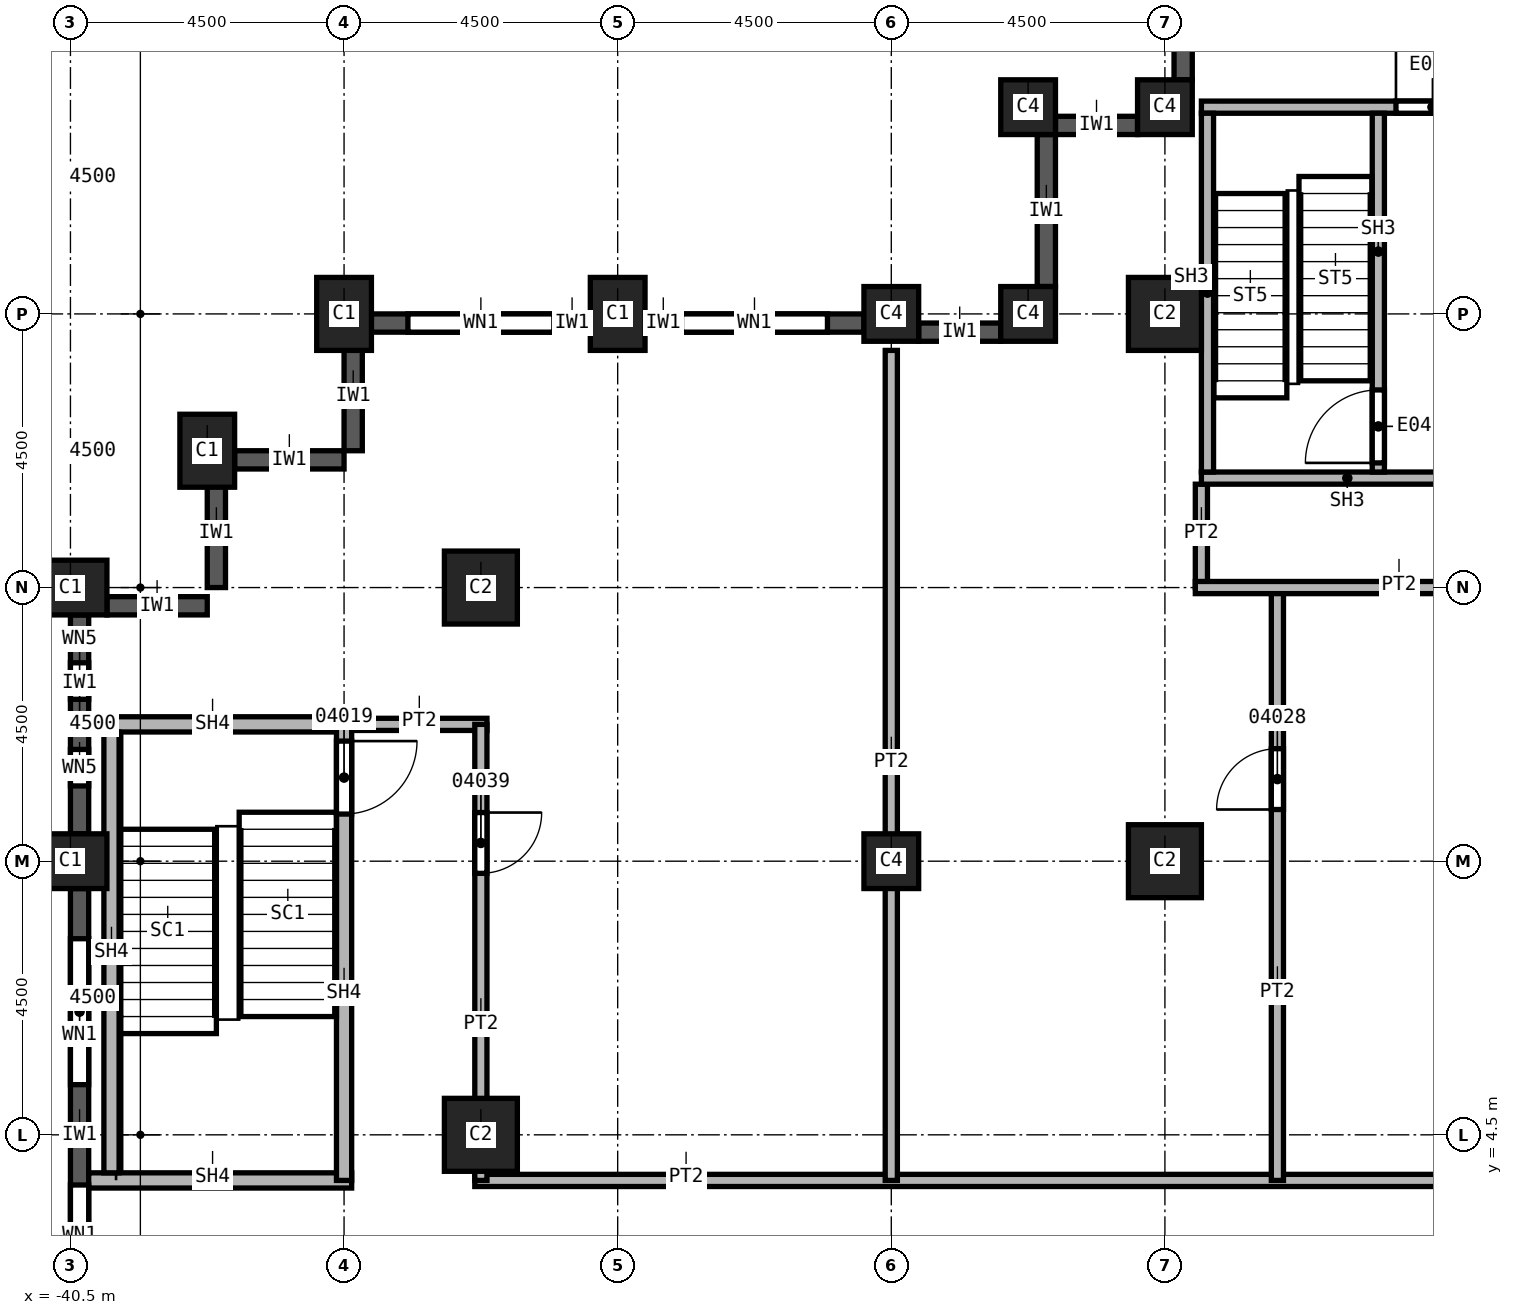
"""IFC4 building model, lengths in metres.
Left out: names, types, materials, properties, quantities, classifications, styles, units other than length and angle.
Written with IfcOpenShell. Run it as: python <this file> out.ifc"""

import sys

from ifc_helpers import new_model, si_unit, direction, frame, frame_2d, origin, origin_2d, place, context, subcontext, project, spatial, rectangle, extrude, element, fill, save


model = new_model("IFC4")
c1 = context("Model", 3, precision=1e-05, world=origin(), true_north=direction((0.0, 1.0)))
c2 = subcontext(c1, "Body", "Model", "MODEL_VIEW")
j1 = project(units=[si_unit("LENGTHUNIT", "METRE"), si_unit("PLANEANGLEUNIT", "RADIAN")], contexts=[c1])
p1 = place(None, origin())
s1 = spatial("IfcSite", under=j1, at=p1, CompositionType="ELEMENT")
p2 = place(p1, origin())
s2 = spatial("IfcBuilding", under=s1, at=p2, CompositionType="ELEMENT")
p3 = place(p2, frame((0.0, 0.0, 104.0)))
s3 = spatial("IfcBuildingStorey", under=s2, at=p3, CompositionType="ELEMENT", Elevation=104.0)
for number, where, z_axis, x_axis in (
    (1, (-40.5, 9.0, 0.0), (0.0, 0.0, 1.0), (0.0, 1.0, 0.0)),
    (2, (-40.5, 13.5, 0.0), (0.0, 0.0, 1.0), (0.0, 1.0, 0.0)),
    (3, (-38.25, 15.75, 0.0), (0.0, 0.0, 1.0), (1.0, 0.0, 0.0)),
    (4, (-31.5, 18.0, 0.0), (0.0, 0.0, 1.0), (1.0, 0.0, 0.0)),
    (5, (-36.0, 18.0, 0.0), (0.0, 0.0, 1.0), (1.0, 0.0, 0.0)),
):
    element("IfcColumn", number, at=place(p3, frame(where, z_axis=z_axis, x_axis=x_axis)), inside=s3, PredefinedType="COLUMN", context=c2, shape_type="SweptSolid", body=[
        extrude(rectangle(XDim=0.9, YDim=1.2, at=origin_2d()), origin(), (0.0, 0.0, 1.0), 3.7),
    ])
for number, where, z_axis, x_axis in (
    (6, (-33.75, 4.5, 0.0), (0.0, 0.0, 1.0), (1.0, 0.0, 0.0)),
    (7, (-33.75, 13.5, 0.0), (0.0, 0.0, 1.0), (1.0, 0.0, 0.0)),
    (8, (-22.5, 9.0, 0.0), (0.0, 0.0, 1.0), (1.0, 0.0, 0.0)),
    (9, (-22.5, 18.0, 0.0), (0.0, 0.0, 1.0), (1.0, 0.0, 0.0)),
):
    element("IfcColumn", number, at=place(p3, frame(where, z_axis=z_axis, x_axis=x_axis)), inside=s3, PredefinedType="COLUMN", context=c2, shape_type="SweptSolid", body=[
        extrude(rectangle(XDim=1.2, YDim=1.2, at=origin_2d()), origin(), (0.0, 0.0, 1.0), 3.7),
    ])
for number, where, z_axis, x_axis in (
    (10, (-27.0, 9.0, 0.0), (0.0, 0.0, 1.0), (1.0, 0.0, 0.0)),
    (11, (-27.0, 18.0, 0.0), (0.0, 0.0, 1.0), (1.0, 0.0, 0.0)),
    (12, (-22.5, 21.4, 0.0), (0.0, 0.0, 1.0), (1.0, 0.0, 0.0)),
    (13, (-24.75, 21.4, 0.0), (0.0, 0.0, 1.0), (1.0, 0.0, 0.0)),
    (14, (-24.75, 18.0, 0.0), (0.0, 0.0, 1.0), (1.0, 0.0, 0.0)),
):
    element("IfcColumn", number, at=place(p3, frame(where, z_axis=z_axis, x_axis=x_axis)), inside=s3, PredefinedType="COLUMN", context=c2, shape_type="SweptSolid", body=[
        extrude(rectangle(XDim=0.9, YDim=0.9, at=origin_2d()), origin(), (0.0, 0.0, 1.0), 3.7),
    ])
for number, where, z_axis, x_axis in (
    (15, (-35.85, 17.55, 0.0), (0.0, 0.0, 1.0), (0.0, -1.0, 0.0)),
    (16, (-37.8, 15.6, 0.0), (0.0, 0.0, 1.0), (1.0, 0.0, 0.0)),
    (17, (-38.1, 15.3, 0.0), (0.0, 0.0, 1.0), (0.0, -1.0, 0.0)),
):
    element("IfcWall", number, at=place(p3, frame(where, z_axis=z_axis, x_axis=x_axis)), inside=s3, PredefinedType="SOLIDWALL", context=c2, shape_type="SweptSolid", body=[
        extrude(rectangle(XDim=1.8, YDim=0.3, at=frame_2d((0.9, 0.0))), origin(), (0.0, 0.0, 1.0), 3.1),
    ])
p4 = place(p3, frame((-39.9, 13.2, 0.0), z_axis=(0.0, 0.0, 1.0), x_axis=(1.0, 0.0, 0.0)))
e18 = element("IfcWall", 18, at=p4, inside=s3, PredefinedType="SOLIDWALL", context=c2, shape_type="SweptSolid", body=[
    extrude(rectangle(XDim=1.65, YDim=0.3, at=frame_2d((0.825, 0.0))), origin(), (0.0, 0.0, 1.0), 3.1),
])
p5 = place(p3, frame((-22.2, 24.2, 0.0), z_axis=(0.0, 0.0, 1.0), x_axis=(0.0, -1.0, 0.0)))
e19 = element("IfcWall", 19, at=p5, inside=s3, PredefinedType="SOLIDWALL", context=c2, shape_type="SweptSolid", body=[
    extrude(rectangle(XDim=2.35, YDim=0.3, at=frame_2d((1.175, 0.0))), origin(), (0.0, 0.0, 1.0), 3.1),
])
p6 = place(p3, frame((-22.95, 21.1, 0.0), z_axis=(0.0, 0.0, 1.0), x_axis=(-1.0, 0.0, 0.0)))
e20 = element("IfcWall", 20, at=p6, inside=s3, PredefinedType="SOLIDWALL", context=c2, shape_type="SweptSolid", body=[
    extrude(rectangle(XDim=1.35, YDim=0.3, at=frame_2d((0.675, 0.0))), origin(), (0.0, 0.0, 1.0), 3.1),
])
p7 = place(p3, frame((-24.45, 20.95, 0.0), z_axis=(0.0, 0.0, 1.0), x_axis=(0.0, -1.0, 0.0)))
e21 = element("IfcWall", 21, at=p7, inside=s3, PredefinedType="SOLIDWALL", context=c2, shape_type="SweptSolid", body=[
    extrude(rectangle(XDim=2.5, YDim=0.3, at=frame_2d((1.25, 0.0))), origin(), (0.0, 0.0, 1.0), 3.1),
])
p8 = place(p3, frame((-25.2, 17.7, 0.0), z_axis=(0.0, 0.0, 1.0), x_axis=(-1.0, 0.0, 0.0)))
e22 = element("IfcWall", 22, at=p8, inside=s3, PredefinedType="SOLIDWALL", context=c2, shape_type="SweptSolid", body=[
    extrude(rectangle(XDim=1.35, YDim=0.3, at=frame_2d((0.675, 0.0))), origin(), (0.0, 0.0, 1.0), 3.1),
])
p9 = place(p3, frame((-27.45, 17.85, 0.0), z_axis=(0.0, 0.0, 1.0), x_axis=(-1.0, 0.0, 0.0)))
e23 = element("IfcWall", 23, at=p9, inside=s3, PredefinedType="SOLIDWALL", context=c2, shape_type="SweptSolid", body=[
    extrude(rectangle(XDim=3.6, YDim=0.3, at=frame_2d((1.8, 0.0))), origin(), (0.0, 0.0, 1.0), 3.1),
])
p10 = place(p9, frame((0.6, 0.0, 0.8)))
e24 = element("IfcOpeningElement", 24, at=p10, cuts=e23, PredefinedType="OPENING", context=c2, shape_type="SweptSolid", body=[
    extrude(rectangle(XDim=2.4, YDim=1.95, at=frame_2d((1.2, 0.975))), frame((0.0, 0.15, 0.0), z_axis=(0.0, -1.0, 0.0), x_axis=(1.0, 0.0, 0.0)), (0.0, 0.0, 1.0), 0.3),
])
p11 = place(p3, frame((-31.95, 17.85, 0.0), z_axis=(0.0, 0.0, 1.0), x_axis=(-1.0, 0.0, 0.0)))
e25 = element("IfcWall", 25, at=p11, inside=s3, PredefinedType="SOLIDWALL", context=c2, shape_type="SweptSolid", body=[
    extrude(rectangle(XDim=3.6, YDim=0.3, at=frame_2d((1.8, 0.0))), origin(), (0.0, 0.0, 1.0), 3.1),
])
p12 = place(p11, frame((0.6, 0.0, 0.8)))
e26 = element("IfcOpeningElement", 26, at=p12, cuts=e25, PredefinedType="OPENING", context=c2, shape_type="SweptSolid", body=[
    extrude(rectangle(XDim=2.4, YDim=1.95, at=frame_2d((1.2, 0.975))), frame((0.0, 0.15, 0.0), z_axis=(0.0, -1.0, 0.0), x_axis=(1.0, 0.0, 0.0)), (0.0, 0.0, 1.0), 0.3),
])
p13 = place(p3, frame((-40.35, 13.05, 0.0), z_axis=(0.0, 0.0, 1.0), x_axis=(0.0, -1.0, 0.0)))
e27 = element("IfcWall", 27, at=p13, inside=s3, PredefinedType="SOLIDWALL", context=c2, shape_type="SweptSolid", body=[
    extrude(rectangle(XDim=3.6, YDim=0.3, at=frame_2d((1.8, 0.0))), origin(), (0.0, 0.0, 1.0), 3.1),
])
p14 = place(p13, frame((0.788, 0.0, 0.8)))
e28 = element("IfcOpeningElement", 28, at=p14, cuts=e27, PredefinedType="OPENING", context=c2, shape_type="SweptSolid", body=[
    extrude(rectangle(XDim=0.6, YDim=1.95, at=frame_2d((0.3, 0.975))), frame((0.0, 0.15, 0.0), z_axis=(0.0, -1.0, 0.0), x_axis=(1.0, 0.0, 0.0)), (0.0, 0.0, 1.0), 0.3),
])
p15 = place(p13, frame((2.212, 0.0, 0.8)))
e29 = element("IfcOpeningElement", 29, at=p15, cuts=e27, PredefinedType="OPENING", context=c2, shape_type="SweptSolid", body=[
    extrude(rectangle(XDim=0.6, YDim=1.95, at=frame_2d((0.3, 0.975))), frame((0.0, 0.15, 0.0), z_axis=(0.0, -1.0, 0.0), x_axis=(1.0, 0.0, 0.0)), (0.0, 0.0, 1.0), 0.3),
])
p16 = place(p3, frame((-40.35, 8.55, 0.0), z_axis=(0.0, 0.0, 1.0), x_axis=(0.0, -1.0, 0.0)))
e30 = element("IfcWall", 30, at=p16, inside=s3, PredefinedType="SOLIDWALL", context=c2, shape_type="SweptSolid", body=[
    extrude(rectangle(XDim=8.1, YDim=0.3, at=frame_2d((4.05, 0.0))), origin(), (0.0, 0.0, 1.0), 3.1),
])
p17 = place(p16, frame((0.825, 0.0, 0.8)))
e31 = element("IfcOpeningElement", 31, at=p17, cuts=e30, PredefinedType="OPENING", context=c2, shape_type="SweptSolid", body=[
    extrude(rectangle(XDim=2.4, YDim=1.95, at=frame_2d((1.2, 0.975))), frame((0.0, 0.15, 0.0), z_axis=(0.0, -1.0, 0.0), x_axis=(1.0, 0.0, 0.0)), (0.0, 0.0, 1.0), 0.3),
])
p18 = place(p16, frame((4.875, 0.0, 0.8)))
e32 = element("IfcOpeningElement", 32, at=p18, cuts=e30, PredefinedType="OPENING", context=c2, shape_type="SweptSolid", body=[
    extrude(rectangle(XDim=2.4, YDim=1.95, at=frame_2d((1.2, 0.975))), frame((0.0, 0.15, 0.0), z_axis=(0.0, -1.0, 0.0), x_axis=(1.0, 0.0, 0.0)), (0.0, 0.0, 1.0), 0.3),
])
p19 = place(p3, frame((-36.0, 11.25, 0.0), z_axis=(0.0, 0.0, 1.0), x_axis=(1.0, 0.0, 0.0)))
e33 = element("IfcWall", 33, at=p19, inside=s3, PredefinedType="PARTITIONING", context=c2, shape_type="SweptSolid", body=[
    extrude(rectangle(XDim=2.35, YDim=0.2, at=frame_2d((1.175, 0.0))), origin(), (0.0, 0.0, 1.0), 3.7),
])
p20 = place(p3, frame((-33.85, 3.75, 0.0), z_axis=(0.0, 0.0, 1.0), x_axis=(1.0, 0.0, 0.0)))
e34 = element("IfcWall", 34, at=p20, inside=s3, PredefinedType="PARTITIONING", context=c2, shape_type="SweptSolid", body=[
    extrude(rectangle(XDim=18.45, YDim=0.2, at=frame_2d((9.225, 0.0))), origin(), (0.0, 0.0, 1.0), 3.7),
])
p21 = place(p3, frame((-33.75, 11.25, 0.0), z_axis=(0.0, 0.0, 1.0), x_axis=(0.0, -1.0, 0.0)))
e35 = element("IfcWall", 35, at=p21, inside=s3, PredefinedType="PARTITIONING", context=c2, shape_type="SweptSolid", body=[
    extrude(rectangle(XDim=7.5, YDim=0.2, at=frame_2d((3.75, 0.0))), origin(), (0.0, 0.0, 1.0), 3.7),
])
p22 = place(p21, frame((1.45, 0.0, 0.0)))
e36 = element("IfcOpeningElement", 36, at=p22, cuts=e35, PredefinedType="OPENING", context=c2, shape_type="SweptSolid", body=[
    extrude(rectangle(XDim=1.0, YDim=2.1, at=frame_2d((0.5, 1.05))), frame((0.0, 0.1, 0.0), z_axis=(0.0, -1.0, 0.0), x_axis=(1.0, 0.0, 0.0)), (0.0, 0.0, 1.0), 0.2),
])
p23 = place(p3, frame((-27.0, 3.75, 0.0), z_axis=(0.0, 0.0, 1.0), x_axis=(0.0, 1.0, 0.0)))
e37 = element("IfcWall", 37, at=p23, inside=s3, PredefinedType="PARTITIONING", context=c2, shape_type="SweptSolid", body=[
    extrude(rectangle(XDim=13.65, YDim=0.2, at=frame_2d((6.825, 0.0))), origin(), (0.0, 0.0, 1.0), 3.7),
])
p24 = place(p3, frame((-21.9, 13.5, 0.0), z_axis=(0.0, 0.0, 1.0), x_axis=(0.0, 1.0, 0.0)))
e38 = element("IfcWall", 38, at=p24, inside=s3, PredefinedType="PARTITIONING", context=c2, shape_type="SweptSolid", body=[
    extrude(rectangle(XDim=1.7, YDim=0.2, at=frame_2d((0.85, 0.0))), origin(), (0.0, 0.0, 1.0), 3.7),
])
p25 = place(p3, frame((-20.65, 3.75, 0.0), z_axis=(0.0, 0.0, 1.0), x_axis=(0.0, 1.0, 0.0)))
e39 = element("IfcWall", 39, at=p25, inside=s3, PredefinedType="PARTITIONING", context=c2, shape_type="SweptSolid", body=[
    extrude(rectangle(XDim=9.75, YDim=0.2, at=frame_2d((4.875, 0.0))), origin(), (0.0, 0.0, 1.0), 3.7),
])
p26 = place(p25, frame((6.1, 0.0, 0.0)))
e40 = element("IfcOpeningElement", 40, at=p26, cuts=e39, PredefinedType="OPENING", context=c2, shape_type="SweptSolid", body=[
    extrude(rectangle(XDim=1.0, YDim=2.1, at=frame_2d((0.5, 1.05))), frame((0.0, 0.1, 0.0), z_axis=(0.0, -1.0, 0.0), x_axis=(1.0, 0.0, 0.0)), (0.0, 0.0, 1.0), 0.2),
])
p27 = place(p3, frame((-15.4, 13.5, 0.0), z_axis=(0.0, 0.0, 1.0), x_axis=(-1.0, 0.0, 0.0)))
e41 = element("IfcWall", 41, at=p27, inside=s3, PredefinedType="PARTITIONING", context=c2, shape_type="SweptSolid", body=[
    extrude(rectangle(XDim=6.6, YDim=0.2, at=frame_2d((3.3, 0.0))), origin(), (0.0, 0.0, 1.0), 3.7),
])
p28 = place(p3, frame((-40.2, 3.75, 0.0), z_axis=(0.0, 0.0, 1.0), x_axis=(1.0, 0.0, 0.0)))
e42 = element("IfcWall", 42, at=p28, inside=s3, PredefinedType="SOLIDWALL", context=c2, shape_type="SweptSolid", body=[
    extrude(rectangle(XDim=4.325, YDim=0.25, at=frame_2d((2.163, 0.0))), origin(), (0.0, 0.0, 1.0), 3.7),
])
p29 = place(p3, frame((-40.2, 11.25, 0.0), z_axis=(0.0, 0.0, 1.0), x_axis=(1.0, 0.0, 0.0)))
e43 = element("IfcWall", 43, at=p29, inside=s3, PredefinedType="SOLIDWALL", context=c2, shape_type="SweptSolid", body=[
    extrude(rectangle(XDim=4.2, YDim=0.25, at=frame_2d((2.1, 0.0))), origin(), (0.0, 0.0, 1.0), 3.7),
])
p30 = place(p3, frame((-36.0, 11.375, 0.0), z_axis=(0.0, 0.0, 1.0), x_axis=(0.0, -1.0, 0.0)))
e44 = element("IfcWall", 44, at=p30, inside=s3, PredefinedType="SOLIDWALL", context=c2, shape_type="SweptSolid", body=[
    extrude(rectangle(XDim=7.625, YDim=0.25, at=frame_2d((3.812, 0.0))), origin(), (0.0, 0.0, 1.0), 3.7),
])
p31 = place(p30, frame((0.4, 0.0, 0.0)))
e45 = element("IfcOpeningElement", 45, at=p31, cuts=e44, PredefinedType="OPENING", context=c2, shape_type="SweptSolid", body=[
    extrude(rectangle(XDim=1.2, YDim=2.1, at=frame_2d((0.6, 1.05))), frame((0.0, 0.125, 0.0), z_axis=(0.0, -1.0, 0.0), x_axis=(1.0, 0.0, 0.0)), (0.0, 0.0, 1.0), 0.25),
])
p32 = place(p3, frame((-21.9, 15.3, 0.0), z_axis=(0.0, 0.0, 1.0), x_axis=(1.0, 0.0, 0.0)))
e46 = element("IfcWall", 46, at=p32, inside=s3, PredefinedType="SOLIDWALL", context=c2, shape_type="SweptSolid", body=[
    extrude(rectangle(XDim=8.275, YDim=0.2, at=frame_2d((4.137, 0.0))), origin(), (0.0, 0.0, 1.0), 3.7),
])
p33 = place(p32, frame((4.8, 0.0, 0.0)))
e47 = element("IfcOpeningElement", 47, at=p33, cuts=e46, PredefinedType="OPENING", context=c2, shape_type="SweptSolid", body=[
    extrude(rectangle(XDim=1.2, YDim=2.1, at=frame_2d((0.6, 1.05))), frame((0.0, 0.1, 0.0), z_axis=(0.0, -1.0, 0.0), x_axis=(1.0, 0.0, 0.0)), (0.0, 0.0, 1.0), 0.2),
])
p34 = place(p3, frame((-21.9, 21.4, 0.0), z_axis=(0.0, 0.0, 1.0), x_axis=(1.0, 0.0, 0.0)))
e48 = element("IfcWall", 48, at=p34, inside=s3, PredefinedType="SOLIDWALL", context=c2, shape_type="SweptSolid", body=[
    extrude(rectangle(XDim=7.8, YDim=0.2, at=frame_2d((3.9, 0.0))), origin(), (0.0, 0.0, 1.0), 3.7),
])
p35 = place(p34, frame((3.2, 0.0, 0.0)))
e49 = element("IfcOpeningElement", 49, at=p35, cuts=e48, PredefinedType="OPENING", context=c2, shape_type="SweptSolid", body=[
    extrude(rectangle(XDim=1.2, YDim=2.1, at=frame_2d((0.6, 1.05))), frame((0.0, 0.1, 0.0), z_axis=(0.0, -1.0, 0.0), x_axis=(1.0, 0.0, 0.0)), (0.0, 0.0, 1.0), 0.2),
])
p36 = place(p3, frame((-21.8, 15.4, 0.0), z_axis=(0.0, 0.0, 1.0), x_axis=(0.0, 1.0, 0.0)))
e50 = element("IfcWall", 50, at=p36, inside=s3, PredefinedType="SOLIDWALL", context=c2, shape_type="SweptSolid", body=[
    extrude(rectangle(XDim=5.9, YDim=0.2, at=frame_2d((2.95, 0.0))), origin(), (0.0, 0.0, 1.0), 3.7),
])
p37 = place(p3, frame((-18.99, 15.4, 0.0), z_axis=(0.0, 0.0, 1.0), x_axis=(0.0, 1.0, 0.0)))
e51 = element("IfcWall", 51, at=p37, inside=s3, PredefinedType="SOLIDWALL", context=c2, shape_type="SweptSolid", body=[
    extrude(rectangle(XDim=5.9, YDim=0.2, at=frame_2d((2.95, 0.0))), origin(), (0.0, 0.0, 1.0), 3.7),
])
p38 = place(p37, frame((0.15, 0.0, 0.0)))
e52 = element("IfcOpeningElement", 52, at=p38, cuts=e51, PredefinedType="OPENING", context=c2, shape_type="SweptSolid", body=[
    extrude(rectangle(XDim=1.2, YDim=2.1, at=frame_2d((0.6, 1.05))), frame((0.0, 0.1, 0.0), z_axis=(0.0, -1.0, 0.0), x_axis=(1.0, 0.0, 0.0)), (0.0, 0.0, 1.0), 0.2),
])
p39 = place(p3, frame((-39.825, 3.875, 0.0), z_axis=(0.0, 0.0, 1.0), x_axis=(0.0, 1.0, 0.0)))
e53 = element("IfcWall", 53, at=p39, inside=s3, PredefinedType="SOLIDWALL", context=c2, shape_type="SweptSolid", body=[
    extrude(rectangle(XDim=7.25, YDim=0.25, at=frame_2d((3.625, 0.0))), origin(), (0.0, 0.0, 1.0), 3.7),
])
p40 = place(p10, origin())
e54 = element("IfcWindow", 54, at=p40, inside=s3, PartitioningType="SINGLE_PANEL", PredefinedType="WINDOW", context=c2, shape_type="SweptSolid", body=[
    extrude(rectangle(XDim=2.4, YDim=1.95, at=frame_2d((1.2, 0.975))), frame((0.0, 0.03, 0.0), z_axis=(0.0, -1.0, 0.0), x_axis=(1.0, 0.0, 0.0)), (0.0, 0.0, 1.0), 0.06),
])
fill(e24, e54)
p41 = place(p12, origin())
e55 = element("IfcWindow", 55, at=p41, inside=s3, PartitioningType="SINGLE_PANEL", PredefinedType="WINDOW", context=c2, shape_type="SweptSolid", body=[
    extrude(rectangle(XDim=2.4, YDim=1.95, at=frame_2d((1.2, 0.975))), frame((0.0, 0.03, 0.0), z_axis=(0.0, -1.0, 0.0), x_axis=(1.0, 0.0, 0.0)), (0.0, 0.0, 1.0), 0.06),
])
fill(e26, e55)
p42 = place(p17, origin())
e56 = element("IfcWindow", 56, at=p42, inside=s3, PartitioningType="SINGLE_PANEL", PredefinedType="WINDOW", context=c2, shape_type="SweptSolid", body=[
    extrude(rectangle(XDim=2.4, YDim=1.95, at=frame_2d((1.2, 0.975))), frame((0.0, 0.03, 0.0), z_axis=(0.0, -1.0, 0.0), x_axis=(1.0, 0.0, 0.0)), (0.0, 0.0, 1.0), 0.06),
])
fill(e31, e56)
p43 = place(p18, origin())
e57 = element("IfcWindow", 57, at=p43, inside=s3, PartitioningType="SINGLE_PANEL", PredefinedType="WINDOW", context=c2, shape_type="SweptSolid", body=[
    extrude(rectangle(XDim=2.4, YDim=1.95, at=frame_2d((1.2, 0.975))), frame((0.0, 0.03, 0.0), z_axis=(0.0, -1.0, 0.0), x_axis=(1.0, 0.0, 0.0)), (0.0, 0.0, 1.0), 0.06),
])
fill(e32, e57)
p44 = place(p31, origin())
e58 = element("IfcDoor", 58, at=p44, inside=s3, OperationType="SINGLE_SWING_RIGHT", PredefinedType="DOOR", context=c2, shape_type="SweptSolid", body=[
    extrude(rectangle(XDim=1.2, YDim=2.1, at=frame_2d((0.6, 1.05))), frame((0.0, 0.025, 0.0), z_axis=(0.0, -1.0, 0.0), x_axis=(1.0, 0.0, 0.0)), (0.0, 0.0, 1.0), 0.05),
])
fill(e45, e58)
p45 = place(p26, origin())
e59 = element("IfcDoor", 59, at=p45, inside=s3, OperationType="SINGLE_SWING_LEFT", PredefinedType="DOOR", context=c2, shape_type="SweptSolid", body=[
    extrude(rectangle(XDim=1.0, YDim=2.1, at=frame_2d((0.5, 1.05))), frame((0.0, 0.025, 0.0), z_axis=(0.0, -1.0, 0.0), x_axis=(1.0, 0.0, 0.0)), (0.0, 0.0, 1.0), 0.05),
])
fill(e40, e59)
p46 = place(p22, origin())
e60 = element("IfcDoor", 60, at=p46, inside=s3, OperationType="SINGLE_SWING_RIGHT", PredefinedType="DOOR", context=c2, shape_type="SweptSolid", body=[
    extrude(rectangle(XDim=1.0, YDim=2.1, at=frame_2d((0.5, 1.05))), frame((0.0, 0.025, 0.0), z_axis=(0.0, -1.0, 0.0), x_axis=(1.0, 0.0, 0.0)), (0.0, 0.0, 1.0), 0.05),
])
fill(e36, e60)
p47 = place(p38, origin())
e61 = element("IfcDoor", 61, at=p47, inside=s3, OperationType="SINGLE_SWING_LEFT", PredefinedType="DOOR", context=c2, shape_type="SweptSolid", body=[
    extrude(rectangle(XDim=1.2, YDim=2.1, at=frame_2d((0.6, 1.05))), frame((0.0, 0.025, 0.0), z_axis=(0.0, -1.0, 0.0), x_axis=(1.0, 0.0, 0.0)), (0.0, 0.0, 1.0), 0.05),
])
fill(e52, e61)
p48 = place(p35, origin())
e62 = element("IfcDoor", 62, at=p48, inside=s3, OperationType="SINGLE_SWING_LEFT", PredefinedType="DOOR", context=c2, shape_type="SweptSolid", body=[
    extrude(rectangle(XDim=1.2, YDim=2.1, at=frame_2d((0.6, 1.05))), frame((0.0, 0.025, 0.0), z_axis=(0.0, -1.0, 0.0), x_axis=(1.0, 0.0, 0.0)), (0.0, 0.0, 1.0), 0.05),
])
fill(e49, e62)
p49 = place(p14, origin())
e63 = element("IfcWindow", 63, at=p49, inside=s3, PartitioningType="SINGLE_PANEL", PredefinedType="WINDOW", context=c2, shape_type="SweptSolid", body=[
    extrude(rectangle(XDim=0.6, YDim=1.95, at=frame_2d((0.3, 0.975))), frame((0.0, 0.03, 0.0), z_axis=(0.0, -1.0, 0.0), x_axis=(1.0, 0.0, 0.0)), (0.0, 0.0, 1.0), 0.06),
])
fill(e28, e63)
p50 = place(p15, origin())
e64 = element("IfcWindow", 64, at=p50, inside=s3, PartitioningType="SINGLE_PANEL", PredefinedType="WINDOW", context=c2, shape_type="SweptSolid", body=[
    extrude(rectangle(XDim=0.6, YDim=1.95, at=frame_2d((0.3, 0.975))), frame((0.0, 0.03, 0.0), z_axis=(0.0, -1.0, 0.0), x_axis=(1.0, 0.0, 0.0)), (0.0, 0.0, 1.0), 0.06),
])
fill(e29, e64)
save(model, sys.argv[1])
